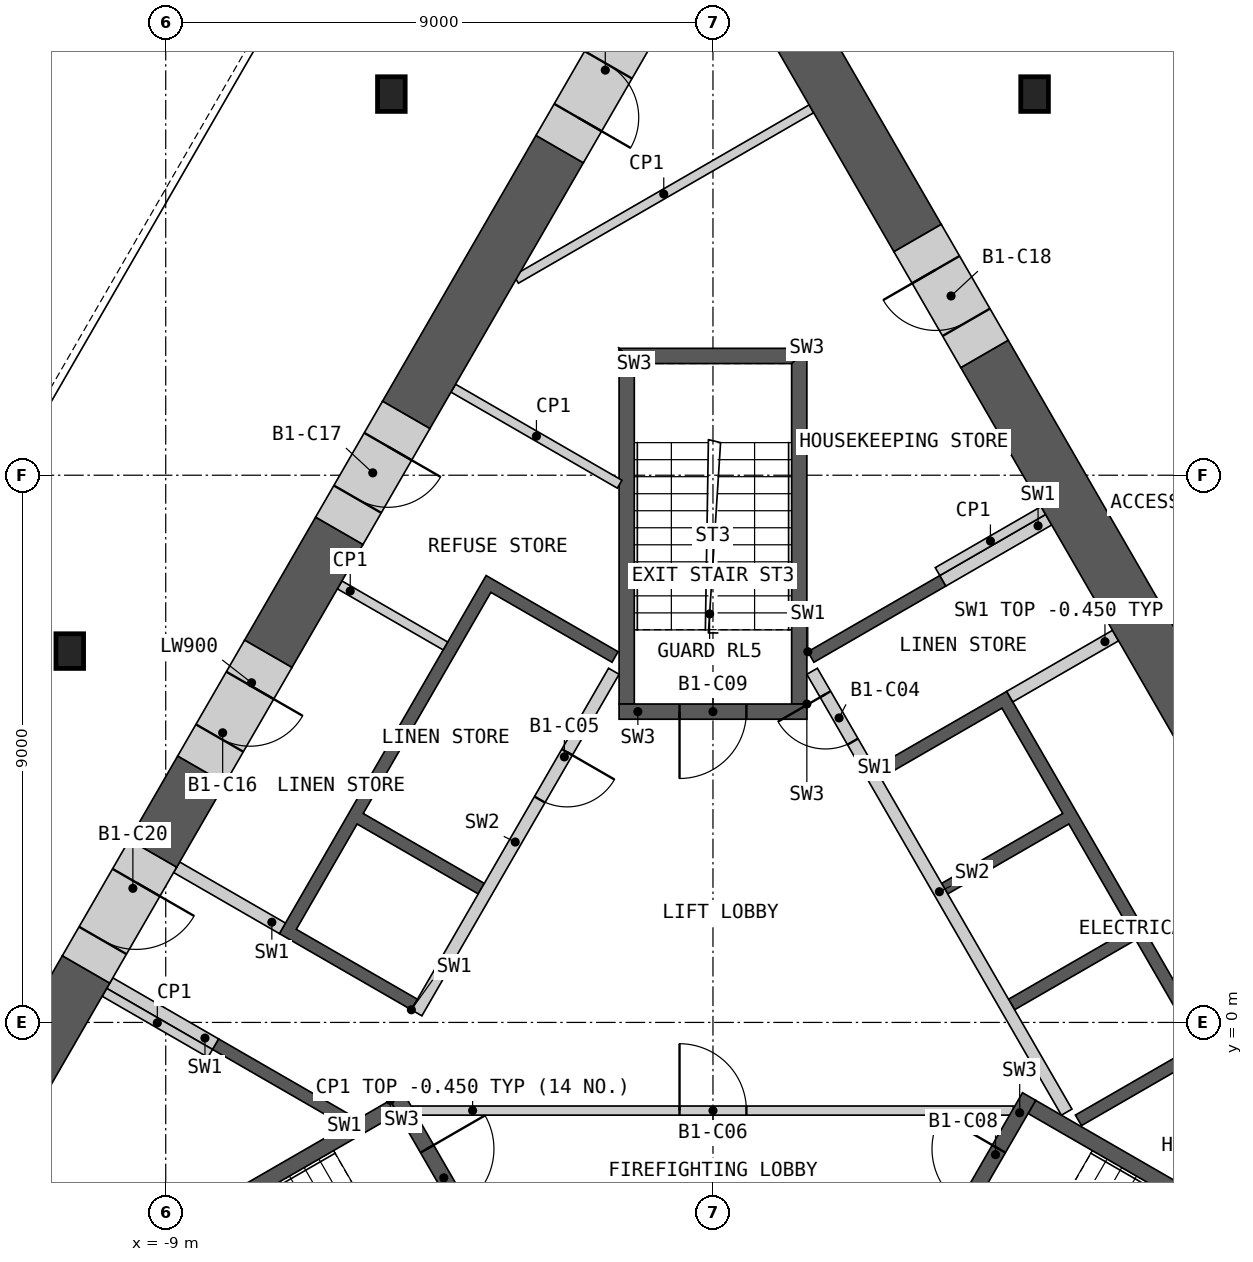
"""IFC4 building model, lengths in metres.
Left out: names, types, materials, properties, quantities, classifications, styles, units other than length and angle.
Written with IfcOpenShell. Run it as: python <this file> out.ifc"""

import sys

from ifc_helpers import new_model, si_unit, direction, frame, frame_2d, origin, origin_2d, place, context, subcontext, project, spatial, polyline, rectangle, i_section, outline, extrude, element, fill, save


model = new_model("IFC4")
c1 = context("Model", 3, precision=1e-05, world=origin(), true_north=direction((0.0, 1.0)))
c2 = subcontext(c1, "Body", "Model", "MODEL_VIEW")
j1 = project(units=[si_unit("LENGTHUNIT", "METRE"), si_unit("PLANEANGLEUNIT", "RADIAN")], contexts=[c1])
p1 = place(None, origin())
s1 = spatial("IfcSite", under=j1, at=p1, CompositionType="ELEMENT")
p2 = place(p1, origin())
s2 = spatial("IfcBuilding", under=s1, at=p2, CompositionType="ELEMENT")
p3 = place(p2, frame((0.0, 0.0, -4.2)))
s3 = spatial("IfcBuildingStorey", under=s2, at=p3, CompositionType="ELEMENT", Elevation=-4.2)
for number, where, z_axis, x_axis in (
    (1, (31.74, -10.542, 0.0), (0.0, 0.0, 1.0), (-0.5, 0.866, 0.0)),
    (2, (-6.74, 32.759, 0.0), (0.0, 0.0, 1.0), (-0.5, -0.866, 0.0)),
):
    element("IfcWall", number, at=place(p3, frame(where, z_axis=z_axis, x_axis=x_axis)), inside=s3, PredefinedType="SOLIDWALL", context=c2, shape_type="SweptSolid", body=[
        extrude(rectangle(XDim=50.0, YDim=0.6, at=frame_2d((25.0, 0.0))), origin(), (0.0, 0.0, 1.0), 3.75),
    ])
for number, where, z_axis, x_axis in (
    (3, (-5.289, 15.269, 0.0), (0.0, 0.0, 1.0), (1.0, 0.0, 0.0)),
    (4, (-10.578, 6.107, 0.0), (0.0, 0.0, 1.0), (1.0, 0.0, 0.0)),
    (5, (5.289, 15.269, 0.0), (0.0, 0.0, 1.0), (1.0, 0.0, 0.0)),
):
    element("IfcColumn", number, at=place(p3, frame(where, z_axis=z_axis, x_axis=x_axis)), inside=s3, PredefinedType="COLUMN", context=c2, shape_type="SweptSolid", body=[
        extrude(i_section(OverallWidth=0.454, OverallDepth=0.57, WebThickness=0.078, FlangeThickness=0.125, at=origin_2d()), origin(), (0.0, 0.0, 1.0), 4.2),
    ])
p4 = place(p3, origin())
e6 = element("IfcWall", 6, at=p4, inside=s3, PredefinedType="SHEAR", context=c2, shape_type="SweptSolid", body=[
    extrude(outline(polyline([(1.561, 6.097), (3.731, 7.35), (3.831, 7.177), (1.66, 5.924), (1.561, 6.097)])), origin(), (0.0, 0.0, 1.0), 3.75),
])
p5 = place(p3, origin())
e7 = element("IfcWall", 7, at=p5, inside=s3, PredefinedType="SHEAR", context=c2, shape_type="SweptSolid", body=[
    extrude(outline(polyline([(2.66, 4.192), (4.831, 5.445), (8.231, -0.444), (6.061, -1.697), (5.96, -1.524), (7.952, -0.374), (6.952, 1.358), (4.96, 0.208), (4.861, 0.381), (6.852, 1.531), (5.852, 3.263), (3.861, 2.113), (3.76, 2.287), (5.752, 3.437), (4.752, 5.169), (2.76, 4.019), (2.66, 4.192)])), origin(), (0.0, 0.0, 1.0), 3.75),
])
p6 = place(p3, frame((5.817, -1.476, 0.0), z_axis=(0.0, 0.0, 1.0), x_axis=(-0.500002616675, 0.866023893041, 0.0)))
e8 = element("IfcWall", 8, at=p6, inside=s3, PredefinedType="SOLIDWALL", context=c2, shape_type="SweptSolid", body=[
    extrude(rectangle(XDim=8.373, YDim=0.2, at=frame_2d((4.187, 0.0))), origin(), (0.0, 0.0, 1.0), 3.75),
])
p7 = place(p6, frame((7.037, 0.0, 0.0)))
e9 = element("IfcOpeningElement", 9, at=p7, cuts=e8, PredefinedType="OPENING", context=c2, shape_type="SweptSolid", body=[
    extrude(rectangle(XDim=0.9, YDim=2.1, at=frame_2d((0.45, 1.05))), frame((0.0, 0.11, 0.0), z_axis=(0.0, -1.0, 0.0), x_axis=(1.0, 0.0, 0.0)), (0.0, 0.0, 1.0), 0.22),
])
p8 = place(p3, frame((4.881, 5.358, 0.0), z_axis=(0.0, 0.0, 1.0), x_axis=(0.866035824272, 0.499981950752, 0.0)))
e10 = element("IfcWall", 10, at=p8, inside=s3, PredefinedType="SHEAR", context=c2, shape_type="SweptSolid", body=[
    extrude(rectangle(XDim=2.009, YDim=0.2, at=frame_2d((1.004, 0.0))), origin(), (0.0, 0.0, 1.0), 3.75),
])
p9 = place(p3, frame((3.781, 7.263, 0.0), z_axis=(0.0, 0.0, 1.0), x_axis=(0.865983199114, 0.50007309351, 0.0)))
e11 = element("IfcWall", 11, at=p9, inside=s3, PredefinedType="SHEAR", context=c2, shape_type="SweptSolid", body=[
    extrude(rectangle(XDim=2.009, YDim=0.2, at=frame_2d((1.004, 0.0))), origin(), (0.0, 0.0, 1.0), 3.75),
])
p10 = place(p3, origin())
e12 = element("IfcWall", 12, at=p10, inside=s3, PredefinedType="SHEAR", context=c2, shape_type="SweptSolid", body=[
    extrude(outline(polyline([(-6.061, -1.697), (-8.231, -0.444), (-8.131, -0.271), (-5.96, -1.524), (-6.061, -1.697)])), origin(), (0.0, 0.0, 1.0), 3.75),
])
p11 = place(p3, origin())
e13 = element("IfcWall", 13, at=p11, inside=s3, PredefinedType="SHEAR", context=c2, shape_type="SweptSolid", body=[
    extrude(outline(polyline([(-4.96, 0.208), (-7.131, 1.461), (-3.731, 7.35), (-1.561, 6.097), (-1.66, 5.924), (-3.652, 7.074), (-5.752, 3.437), (-3.76, 2.287), (-3.861, 2.113), (-5.852, 3.263), (-6.852, 1.531), (-4.861, 0.381), (-4.96, 0.208)])), origin(), (0.0, 0.0, 1.0), 3.75),
])
p12 = place(p3, frame((-1.631, 5.776, 0.0), z_axis=(0.0, 0.0, 1.0), x_axis=(-0.499992876559, -0.866029516466, 0.0)))
e14 = element("IfcWall", 14, at=p12, inside=s3, PredefinedType="SOLIDWALL", context=c2, shape_type="SweptSolid", body=[
    extrude(rectangle(XDim=6.486, YDim=0.2, at=frame_2d((3.243, 0.0))), origin(), (0.0, 0.0, 1.0), 3.75),
])
p13 = place(p12, frame((1.537, 0.0, 0.0)))
e15 = element("IfcOpeningElement", 15, at=p13, cuts=e14, PredefinedType="OPENING", context=c2, shape_type="SweptSolid", body=[
    extrude(rectangle(XDim=0.9, YDim=2.1, at=frame_2d((0.45, 1.05))), frame((0.0, 0.11, 0.0), z_axis=(0.0, -1.0, 0.0), x_axis=(1.0, 0.0, 0.0)), (0.0, 0.0, 1.0), 0.22),
])
p14 = place(p3, frame((-7.081, 1.548, 0.0), z_axis=(0.0, 0.0, 1.0), x_axis=(-0.865983199114, 0.50007309351, 0.0)))
e16 = element("IfcWall", 16, at=p14, inside=s3, PredefinedType="SHEAR", context=c2, shape_type="SweptSolid", body=[
    extrude(rectangle(XDim=2.009, YDim=0.2, at=frame_2d((1.004, 0.0))), origin(), (0.0, 0.0, 1.0), 3.75),
])
p15 = place(p3, frame((-8.181, -0.357, 0.0), z_axis=(0.0, 0.0, 1.0), x_axis=(-0.866035824272, 0.499981950752, 0.0)))
e17 = element("IfcWall", 17, at=p15, inside=s3, PredefinedType="SHEAR", context=c2, shape_type="SweptSolid", body=[
    extrude(rectangle(XDim=2.009, YDim=0.2, at=frame_2d((1.004, 0.0))), origin(), (0.0, 0.0, 1.0), 3.75),
])
p16 = place(p3, frame((-4.941, -1.45, 0.0), z_axis=(0.0, 0.0, 1.0), x_axis=(1.0, 0.0, 0.0)))
e18 = element("IfcWall", 18, at=p16, inside=s3, PredefinedType="PARTITIONING", context=c2, shape_type="SweptSolid", body=[
    extrude(rectangle(XDim=9.882, YDim=0.15, at=frame_2d((4.941, 0.0))), origin(), (0.0, 0.0, 1.0), 3.75),
])
p17 = place(p16, frame((4.391, 0.0, 0.0)))
e19 = element("IfcOpeningElement", 19, at=p17, cuts=e18, PredefinedType="OPENING", context=c2, shape_type="SweptSolid", body=[
    extrude(rectangle(XDim=1.1, YDim=2.1, at=frame_2d((0.55, 1.05))), frame((0.0, 0.085, 0.0), z_axis=(0.0, -1.0, 0.0), x_axis=(1.0, 0.0, 0.0)), (0.0, 0.0, 1.0), 0.17),
])
p18 = place(p3, origin())
e20 = element("IfcWall", 20, at=p18, inside=s3, PredefinedType="SHEAR", context=c2, shape_type="SweptSolid", body=[
    extrude(outline(polyline([(-5.307, -1.281), (-10.374, -4.206), (-10.032, -4.298), (-5.182, -1.498), (-5.307, -1.281)])), origin(), (0.0, 0.0, 1.0), 3.75),
])
p19 = place(p3, frame((-5.199, -1.219, 0.0), z_axis=(0.0, 0.0, 1.0), x_axis=(0.499982516597, -0.866035497597, 0.0)))
e21 = element("IfcWall", 21, at=p19, inside=s3, PredefinedType="SHEAR", context=c2, shape_type="SweptSolid", body=[
    extrude(rectangle(XDim=3.088, YDim=0.25, at=frame_2d((1.544, 0.0))), origin(), (0.0, 0.0, 1.0), 3.75),
])
p20 = place(p19, frame((0.994, 0.0, 0.0)))
e22 = element("IfcOpeningElement", 22, at=p20, cuts=e21, PredefinedType="OPENING", context=c2, shape_type="SweptSolid", body=[
    extrude(rectangle(XDim=1.1, YDim=2.1, at=frame_2d((0.55, 1.05))), frame((0.0, 0.135, 0.0), z_axis=(0.0, -1.0, 0.0), x_axis=(1.0, 0.0, 0.0)), (0.0, 0.0, 1.0), 0.27),
])
p21 = place(p3, origin())
e23 = element("IfcWall", 23, at=p21, inside=s3, PredefinedType="SHEAR", context=c2, shape_type="SweptSolid", body=[
    extrude(outline(polyline([(10.032, -4.298), (10.374, -4.206), (5.307, -1.281), (5.182, -1.498), (10.032, -4.298)])), origin(), (0.0, 0.0, 1.0), 3.75),
])
p22 = place(p3, frame((3.655, -3.893, 0.0), z_axis=(0.0, 0.0, 1.0), x_axis=(0.499982516597, 0.866035497597, 0.0)))
e24 = element("IfcWall", 24, at=p22, inside=s3, PredefinedType="SHEAR", context=c2, shape_type="SweptSolid", body=[
    extrude(rectangle(XDim=3.088, YDim=0.25, at=frame_2d((1.544, 0.0))), origin(), (0.0, 0.0, 1.0), 3.75),
])
p23 = place(p22, frame((0.994, 0.0, 0.0)))
e25 = element("IfcOpeningElement", 25, at=p23, cuts=e24, PredefinedType="OPENING", context=c2, shape_type="SweptSolid", body=[
    extrude(rectangle(XDim=1.1, YDim=2.1, at=frame_2d((0.55, 1.05))), frame((0.0, 0.135, 0.0), z_axis=(0.0, -1.0, 0.0), x_axis=(1.0, 0.0, 0.0)), (0.0, 0.0, 1.0), 0.27),
])
p24 = place(p3, origin())
e26 = element("IfcWall", 26, at=p24, inside=s3, PredefinedType="SHEAR", context=c2, shape_type="SweptSolid", body=[
    extrude(outline(polyline([(1.544, 5.237), (1.544, 11.087), (1.294, 10.837), (1.294, 5.237), (1.544, 5.237)])), origin(), (0.0, 0.0, 1.0), 3.75),
])
p25 = place(p3, origin())
e27 = element("IfcWall", 27, at=p25, inside=s3, PredefinedType="SHEAR", context=c2, shape_type="SweptSolid", body=[
    extrude(outline(polyline([(1.544, 11.087), (-1.544, 11.087), (-1.294, 10.837), (1.294, 10.837), (1.544, 11.087)])), origin(), (0.0, 0.0, 1.0), 3.75),
])
p26 = place(p3, origin())
e28 = element("IfcWall", 28, at=p26, inside=s3, PredefinedType="SHEAR", context=c2, shape_type="SweptSolid", body=[
    extrude(outline(polyline([(-1.294, 10.837), (-1.544, 11.087), (-1.544, 5.237), (-1.294, 5.237), (-1.294, 10.837)])), origin(), (0.0, 0.0, 1.0), 3.75),
])
p27 = place(p3, frame((1.544, 5.112, 0.0), z_axis=(0.0, 0.0, 1.0), x_axis=(-1.0, 0.0, 0.0)))
e29 = element("IfcWall", 29, at=p27, inside=s3, PredefinedType="SHEAR", context=c2, shape_type="SweptSolid", body=[
    extrude(rectangle(XDim=3.088, YDim=0.25, at=frame_2d((1.544, 0.0))), origin(), (0.0, 0.0, 1.0), 3.75),
])
p28 = place(p27, frame((0.994, 0.0, 0.0)))
e30 = element("IfcOpeningElement", 30, at=p28, cuts=e29, PredefinedType="OPENING", context=c2, shape_type="SweptSolid", body=[
    extrude(rectangle(XDim=1.1, YDim=2.1, at=frame_2d((0.55, 1.05))), frame((0.0, 0.135, 0.0), z_axis=(0.0, -1.0, 0.0), x_axis=(1.0, 0.0, 0.0)), (0.0, 0.0, 1.0), 0.27),
])
for number, where, z_axis, x_axis in (
    (31, (3.693, 7.415, 0.0), (0.0, 0.0, 1.0), (0.866, 0.5, 0.0)),
    (32, (-8.268, -0.509, 0.0), (0.0, 0.0, 1.0), (-0.866, 0.5, 0.0)),
    (33, (-6.139, 7.196, 0.0), (0.0, 0.0, 1.0), (0.866, -0.5, 0.0)),
):
    element("IfcWall", number, at=place(p3, frame(where, z_axis=z_axis, x_axis=x_axis)), inside=s3, PredefinedType="PARTITIONING", context=c2, shape_type="SweptSolid", body=[
        extrude(rectangle(XDim=2.009, YDim=0.15, at=frame_2d((1.004, 0.0))), origin(), (0.0, 0.0, 1.0), 3.75),
    ])
p29 = place(p3, frame((-4.271, 10.432, 0.0), z_axis=(0.0, 0.0, 1.0), x_axis=(0.866018279777, -0.50001233894, 0.0)))
e34 = element("IfcWall", 34, at=p29, inside=s3, PredefinedType="PARTITIONING", context=c2, shape_type="SweptSolid", body=[
    extrude(rectangle(XDim=3.159, YDim=0.15, at=frame_2d((1.58, 0.0))), origin(), (0.0, 0.0, 1.0), 3.75),
])
p30 = place(p3, frame((1.619, 15.026, 0.0), z_axis=(0.0, 0.0, 1.0), x_axis=(-0.866015917575, -0.500016430238, 0.0)))
e35 = element("IfcWall", 35, at=p30, inside=s3, PredefinedType="PARTITIONING", context=c2, shape_type="SweptSolid", body=[
    extrude(rectangle(XDim=5.607, YDim=0.15, at=frame_2d((2.804, 0.0))), origin(), (0.0, 0.0, 1.0), 3.75),
])
p31 = place(p3, frame((8.16, 4.596, 0.0), z_axis=(0.0, 0.0, 1.0), x_axis=(-0.500012259336, 0.866018325738, 0.0)))
e36 = element("IfcWall", 36, at=p31, inside=s3, PredefinedType="SHEAR", context=c2, shape_type="SweptSolid", body=[
    extrude(rectangle(XDim=7.389, YDim=0.9, at=frame_2d((3.695, 0.0))), origin(), (0.0, 0.0, 1.0), 3.75),
])
p32 = place(p3, frame((3.365, 12.9, 0.0), z_axis=(0.0, 0.0, 1.0), x_axis=(-0.499981657175, 0.86603599376, 0.0)))
e37 = element("IfcWall", 37, at=p32, inside=s3, PredefinedType="SHEAR", context=c2, shape_type="SweptSolid", body=[
    extrude(rectangle(XDim=5.952, YDim=0.9, at=frame_2d((2.976, 0.0))), origin(), (0.0, 0.0, 1.0), 3.75),
])
p33 = place(p3, frame((-2.521, 14.364, 0.0), z_axis=(0.0, 0.0, 1.0), x_axis=(-0.500014099723, -0.866017263153, 0.0)))
e38 = element("IfcWall", 38, at=p33, inside=s3, PredefinedType="SHEAR", context=c2, shape_type="SweptSolid", body=[
    extrude(rectangle(XDim=5.048, YDim=0.9, at=frame_2d((2.524, 0.0))), origin(), (0.0, 0.0, 1.0), 3.75),
])
p34 = place(p3, frame((-10.31, 0.872, 0.0), z_axis=(0.0, 0.0, 1.0), x_axis=(-0.499968858743, -0.866043382451, 0.0)))
e39 = element("IfcWall", 39, at=p34, inside=s3, PredefinedType="SHEAR", context=c2, shape_type="SweptSolid", body=[
    extrude(rectangle(XDim=4.546, YDim=0.9, at=frame_2d((2.273, 0.0))), origin(), (0.0, 0.0, 1.0), 3.75),
])
p35 = place(p3, frame((-6.145, 8.086, 0.0), z_axis=(0.0, 0.0, 1.0), x_axis=(-0.500026924946, -0.866009858102, 0.0)))
e40 = element("IfcWall", 40, at=p35, inside=s3, PredefinedType="SHEAR", context=c2, shape_type="SweptSolid", body=[
    extrude(rectangle(XDim=2.337, YDim=0.9, at=frame_2d((1.168, 0.0))), origin(), (0.0, 0.0, 1.0), 3.75),
])
p36 = place(p3, frame((-8.413, 4.157, 0.0), z_axis=(0.0, 0.0, 1.0), x_axis=(-0.499961121316, -0.86604784924, 0.0)))
e41 = element("IfcWall", 41, at=p36, inside=s3, PredefinedType="SHEAR", context=c2, shape_type="SweptSolid", body=[
    extrude(rectangle(XDim=1.594, YDim=0.9, at=frame_2d((0.797, 0.0))), origin(), (0.0, 0.0, 1.0), 3.75),
])
p37 = place(p3, frame((-7.313, 6.062, 0.0), z_axis=(0.0, 0.0, 1.0), x_axis=(-0.500077893725, -0.86598042715, 0.0)))
e42 = element("IfcWall", 42, at=p37, inside=s3, PredefinedType="SHEAR", context=c2, shape_type="SweptSolid", body=[
    extrude(rectangle(XDim=2.2, YDim=0.9, at=frame_2d((1.1, 0.0))), origin(), (0.0, 0.0, 1.0), 3.75),
])
p38 = place(p37, frame((0.6, 0.0, 0.0)))
e43 = element("IfcOpeningElement", 43, at=p38, cuts=e42, PredefinedType="OPENING", context=c2, shape_type="SweptSolid", body=[
    extrude(rectangle(XDim=1.0, YDim=2.1, at=frame_2d((0.5, 1.05))), frame((0.0, 0.46, 0.0), z_axis=(0.0, -1.0, 0.0), x_axis=(1.0, 0.0, 0.0)), (0.0, 0.0, 1.0), 0.92),
])
p39 = place(p3, frame((-5.045, 9.992, 0.0), z_axis=(0.0, 0.0, 1.0), x_axis=(-0.499898558967, -0.866083962871, 0.0)))
e44 = element("IfcWall", 44, at=p39, inside=s3, PredefinedType="SHEAR", context=c2, shape_type="SweptSolid", body=[
    extrude(rectangle(XDim=2.2, YDim=0.9, at=frame_2d((1.1, 0.0))), origin(), (0.0, 0.0, 1.0), 3.75),
])
p40 = place(p39, frame((0.6, 0.0, 0.0)))
e45 = element("IfcOpeningElement", 45, at=p40, cuts=e44, PredefinedType="OPENING", context=c2, shape_type="SweptSolid", body=[
    extrude(rectangle(XDim=1.0, YDim=2.1, at=frame_2d((0.5, 1.05))), frame((0.0, 0.46, 0.0), z_axis=(0.0, -1.0, 0.0), x_axis=(1.0, 0.0, 0.0)), (0.0, 0.0, 1.0), 0.92),
])
p41 = place(p3, frame((4.466, 10.995, 0.0), z_axis=(0.0, 0.0, 1.0), x_axis=(-0.500077893725, 0.86598042715, 0.0)))
e46 = element("IfcWall", 46, at=p41, inside=s3, PredefinedType="SHEAR", context=c2, shape_type="SweptSolid", body=[
    extrude(rectangle(XDim=2.2, YDim=0.9, at=frame_2d((1.1, 0.0))), origin(), (0.0, 0.0, 1.0), 3.75),
])
p42 = place(p41, frame((0.6, 0.0, 0.0)))
e47 = element("IfcOpeningElement", 47, at=p42, cuts=e46, PredefinedType="OPENING", context=c2, shape_type="SweptSolid", body=[
    extrude(rectangle(XDim=1.0, YDim=2.1, at=frame_2d((0.5, 1.05))), frame((0.0, 0.46, 0.0), z_axis=(0.0, -1.0, 0.0), x_axis=(1.0, 0.0, 0.0)), (0.0, 0.0, 1.0), 0.92),
])
p43 = place(p3, frame((-1.421, 16.269, 0.0), z_axis=(0.0, 0.0, 1.0), x_axis=(-0.50002983664, -0.866008176907, 0.0)))
e48 = element("IfcWall", 48, at=p43, inside=s3, PredefinedType="SHEAR", context=c2, shape_type="SweptSolid", body=[
    extrude(rectangle(XDim=2.2, YDim=0.9, at=frame_2d((1.1, 0.0))), origin(), (0.0, 0.0, 1.0), 3.75),
])
p44 = place(p43, frame((0.6, 0.0, 0.0)))
e49 = element("IfcOpeningElement", 49, at=p44, cuts=e48, PredefinedType="OPENING", context=c2, shape_type="SweptSolid", body=[
    extrude(rectangle(XDim=1.0, YDim=2.1, at=frame_2d((0.5, 1.05))), frame((0.0, 0.46, 0.0), z_axis=(0.0, -1.0, 0.0), x_axis=(1.0, 0.0, 0.0)), (0.0, 0.0, 1.0), 0.92),
])
p45 = place(p3, frame((-9.21, 2.777, 0.0), z_axis=(0.0, 0.0, 1.0), x_axis=(-0.500077893725, -0.86598042715, 0.0)))
e50 = element("IfcWall", 50, at=p45, inside=s3, PredefinedType="SHEAR", context=c2, shape_type="SweptSolid", body=[
    extrude(rectangle(XDim=2.2, YDim=0.9, at=frame_2d((1.1, 0.0))), origin(), (0.0, 0.0, 1.0), 3.75),
])
p46 = place(p45, frame((0.55, 0.0, 0.0)))
e51 = element("IfcOpeningElement", 51, at=p46, cuts=e50, PredefinedType="OPENING", context=c2, shape_type="SweptSolid", body=[
    extrude(rectangle(XDim=1.1, YDim=2.1, at=frame_2d((0.55, 1.05))), frame((0.0, 0.46, 0.0), z_axis=(0.0, -1.0, 0.0), x_axis=(1.0, 0.0, 0.0)), (0.0, 0.0, 1.0), 0.92),
])
p47 = place(p7, origin())
e52 = element("IfcDoor", 52, at=p47, inside=s3, OperationType="SINGLE_SWING_RIGHT", PredefinedType="DOOR", context=c2, shape_type="SweptSolid", body=[
    extrude(rectangle(XDim=0.9, YDim=2.1, at=frame_2d((0.45, 1.05))), frame((0.0, 0.025, 0.0), z_axis=(0.0, -1.0, 0.0), x_axis=(1.0, 0.0, 0.0)), (0.0, 0.0, 1.0), 0.05),
])
fill(e9, e52)
p48 = place(p13, origin())
e53 = element("IfcDoor", 53, at=p48, inside=s3, OperationType="SINGLE_SWING_LEFT", PredefinedType="DOOR", context=c2, shape_type="SweptSolid", body=[
    extrude(rectangle(XDim=0.9, YDim=2.1, at=frame_2d((0.45, 1.05))), frame((0.0, 0.025, 0.0), z_axis=(0.0, -1.0, 0.0), x_axis=(1.0, 0.0, 0.0)), (0.0, 0.0, 1.0), 0.05),
])
fill(e15, e53)
p49 = place(p17, origin())
e54 = element("IfcDoor", 54, at=p49, inside=s3, OperationType="SINGLE_SWING_LEFT", PredefinedType="DOOR", context=c2, shape_type="SweptSolid", body=[
    extrude(rectangle(XDim=1.1, YDim=2.1, at=frame_2d((0.55, 1.05))), frame((0.0, 0.025, 0.0), z_axis=(0.0, -1.0, 0.0), x_axis=(1.0, 0.0, 0.0)), (0.0, 0.0, 1.0), 0.05),
])
fill(e19, e54)
p50 = place(p20, origin())
e55 = element("IfcDoor", 55, at=p50, inside=s3, OperationType="SINGLE_SWING_LEFT", PredefinedType="DOOR", context=c2, shape_type="SweptSolid", body=[
    extrude(rectangle(XDim=1.1, YDim=2.1, at=frame_2d((0.55, 1.05))), frame((0.0, 0.025, 0.0), z_axis=(0.0, -1.0, 0.0), x_axis=(1.0, 0.0, 0.0)), (0.0, 0.0, 1.0), 0.05),
])
fill(e22, e55)
p51 = place(p23, origin())
e56 = element("IfcDoor", 56, at=p51, inside=s3, OperationType="SINGLE_SWING_RIGHT", PredefinedType="DOOR", context=c2, shape_type="SweptSolid", body=[
    extrude(rectangle(XDim=1.1, YDim=2.1, at=frame_2d((0.55, 1.05))), frame((0.0, 0.025, 0.0), z_axis=(0.0, -1.0, 0.0), x_axis=(1.0, 0.0, 0.0)), (0.0, 0.0, 1.0), 0.05),
])
fill(e25, e56)
p52 = place(p28, origin())
e57 = element("IfcDoor", 57, at=p52, inside=s3, OperationType="SINGLE_SWING_RIGHT", PredefinedType="DOOR", context=c2, shape_type="SweptSolid", body=[
    extrude(rectangle(XDim=1.1, YDim=2.1, at=frame_2d((0.55, 1.05))), frame((0.0, 0.025, 0.0), z_axis=(0.0, -1.0, 0.0), x_axis=(1.0, 0.0, 0.0)), (0.0, 0.0, 1.0), 0.05),
])
fill(e30, e57)
p53 = place(p38, origin())
e58 = element("IfcDoor", 58, at=p53, inside=s3, OperationType="SINGLE_SWING_LEFT", PredefinedType="DOOR", context=c2, shape_type="SweptSolid", body=[
    extrude(rectangle(XDim=1.0, YDim=2.1, at=frame_2d((0.5, 1.05))), frame((0.0, 0.205, 0.0), z_axis=(0.0, -1.0, 0.0), x_axis=(1.0, 0.0, 0.0)), (0.0, 0.0, 1.0), 0.05),
])
fill(e43, e58)
p54 = place(p40, origin())
e59 = element("IfcDoor", 59, at=p54, inside=s3, OperationType="SINGLE_SWING_LEFT", PredefinedType="DOOR", context=c2, shape_type="SweptSolid", body=[
    extrude(rectangle(XDim=1.0, YDim=2.1, at=frame_2d((0.5, 1.05))), frame((0.0, 0.205, 0.0), z_axis=(0.0, -1.0, 0.0), x_axis=(1.0, 0.0, 0.0)), (0.0, 0.0, 1.0), 0.05),
])
fill(e45, e59)
p55 = place(p42, origin())
e60 = element("IfcDoor", 60, at=p55, inside=s3, OperationType="SINGLE_SWING_RIGHT", PredefinedType="DOOR", context=c2, shape_type="SweptSolid", body=[
    extrude(rectangle(XDim=1.0, YDim=2.1, at=frame_2d((0.5, 1.05))), frame((0.0, 0.205, 0.0), z_axis=(0.0, -1.0, 0.0), x_axis=(1.0, 0.0, 0.0)), (0.0, 0.0, 1.0), 0.05),
])
fill(e47, e60)
p56 = place(p44, origin())
e61 = element("IfcDoor", 61, at=p56, inside=s3, OperationType="SINGLE_SWING_RIGHT", PredefinedType="DOOR", context=c2, shape_type="SweptSolid", body=[
    extrude(rectangle(XDim=1.0, YDim=2.1, at=frame_2d((0.5, 1.05))), frame((0.0, 0.205, 0.0), z_axis=(0.0, -1.0, 0.0), x_axis=(1.0, 0.0, 0.0)), (0.0, 0.0, 1.0), 0.05),
])
fill(e49, e61)
p57 = place(p46, origin())
e62 = element("IfcDoor", 62, at=p57, inside=s3, OperationType="SINGLE_SWING_LEFT", PredefinedType="DOOR", context=c2, shape_type="SweptSolid", body=[
    extrude(rectangle(XDim=1.1, YDim=2.1, at=frame_2d((0.55, 1.05))), frame((0.0, 0.205, 0.0), z_axis=(0.0, -1.0, 0.0), x_axis=(1.0, 0.0, 0.0)), (0.0, 0.0, 1.0), 0.05),
])
fill(e51, e62)
save(model, sys.argv[1])
